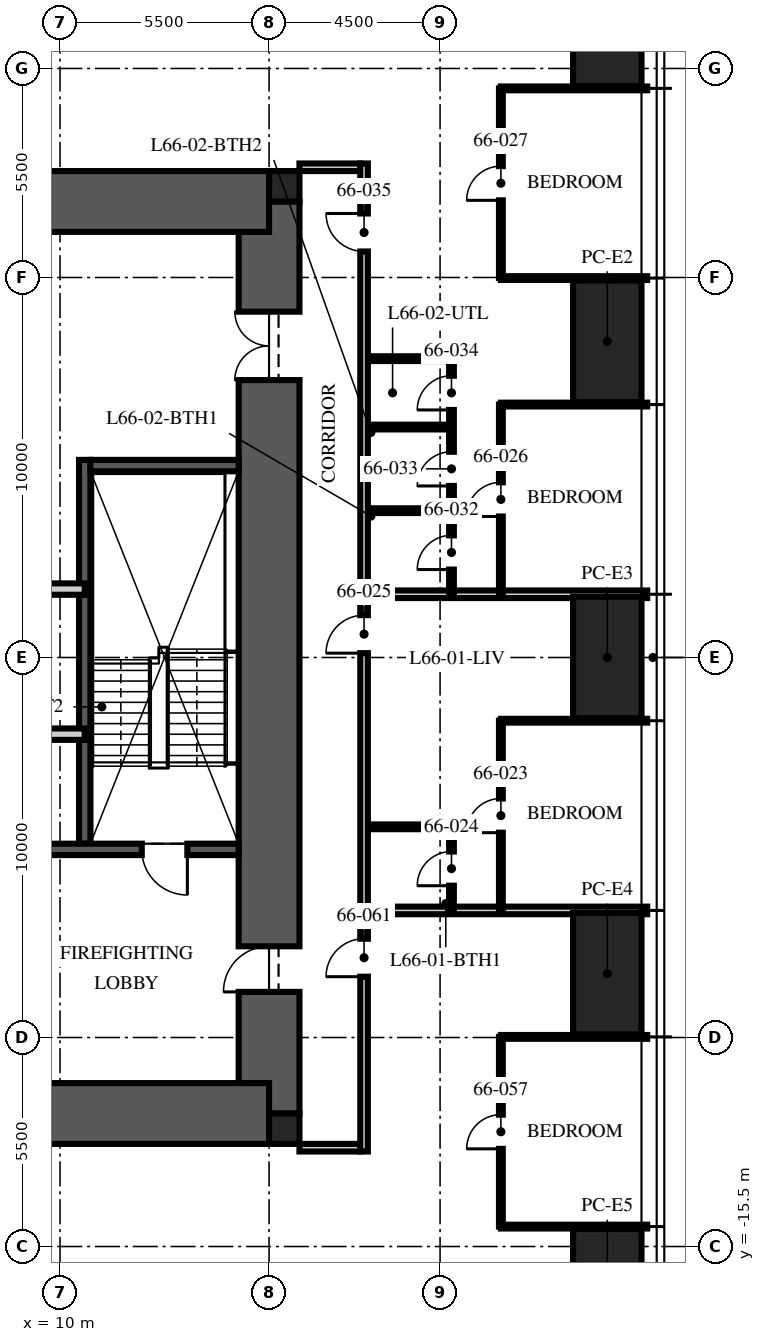
"""IFC4 building model, lengths in metres.
Left out: names, types, materials, properties, quantities, classifications, styles, units other than length and angle.
Written with IfcOpenShell. Run it as: python <this file> out.ifc"""

import sys

from ifc_helpers import new_model, si_unit, direction, frame, frame_2d, origin, origin_2d, place, context, subcontext, project, spatial, rectangle, hollow_rectangle, extrude, element, fill, save


model = new_model("IFC4")
c1 = context("Model", 3, precision=1e-05, world=origin(), true_north=direction((0.0, 1.0)))
c2 = subcontext(c1, "Body", "Model", "MODEL_VIEW")
j1 = project(units=[si_unit("LENGTHUNIT", "METRE"), si_unit("PLANEANGLEUNIT", "RADIAN")], contexts=[c1])
p1 = place(None, origin())
s1 = spatial("IfcSite", under=j1, at=p1, CompositionType="ELEMENT")
p2 = place(p1, origin())
s2 = spatial("IfcBuilding", under=s1, at=p2, CompositionType="ELEMENT")
p3 = place(p2, frame((0.0, 0.0, 263.25)))
s3 = spatial("IfcBuildingStorey", under=s2, at=p3, CompositionType="ELEMENT", Elevation=263.25)
p4 = place(p3, frame((15.5, -12.0, -0.25), z_axis=(0.0, 0.0, 1.0), x_axis=(0.0, 1.0, 0.0)))
e1 = element("IfcWall", 1, at=p4, inside=s3, PredefinedType="SHEAR", context=c2, shape_type="SweptSolid", body=[
    extrude(rectangle(XDim=24.0, YDim=1.6, at=frame_2d((12.0, 0.0))), origin(), (0.0, 0.0, 1.0), 3.75),
])
p5 = place(p4, frame((3.2, 0.0, 0.25)))
e2 = element("IfcOpeningElement", 2, at=p5, cuts=e1, PredefinedType="OPENING", context=c2, shape_type="SweptSolid", body=[
    extrude(rectangle(XDim=1.2, YDim=2.1, at=frame_2d((0.6, 1.05))), frame((0.0, 0.81, 0.0), z_axis=(0.0, -1.0, 0.0), x_axis=(1.0, 0.0, 0.0)), (0.0, 0.0, 1.0), 1.62),
])
p6 = place(p4, frame((19.3, 0.0, 0.25)))
e3 = element("IfcOpeningElement", 3, at=p6, cuts=e1, PredefinedType="OPENING", context=c2, shape_type="SweptSolid", body=[
    extrude(rectangle(XDim=1.8, YDim=2.1, at=frame_2d((0.9, 1.05))), frame((0.0, 0.81, 0.0), z_axis=(0.0, -1.0, 0.0), x_axis=(1.0, 0.0, 0.0)), (0.0, 0.0, 1.0), 1.62),
])
for number, where, z_axis, x_axis in (
    (4, (-15.5, 12.0, -0.25), (0.0, 0.0, 1.0), (1.0, 0.0, 0.0)),
    (5, (-15.5, -12.0, -0.25), (0.0, 0.0, 1.0), (1.0, 0.0, 0.0)),
):
    element("IfcWall", number, at=place(p3, frame(where, z_axis=z_axis, x_axis=x_axis)), inside=s3, PredefinedType="SHEAR", context=c2, shape_type="SweptSolid", body=[
        extrude(rectangle(XDim=31.0, YDim=1.6, at=frame_2d((15.5, 0.0))), origin(), (0.0, 0.0, 1.0), 3.75),
    ])
for number, where, z_axis, x_axis in (
    (6, (15.9, 12.4, -0.25), (0.0, 0.0, 1.0), (1.0, 0.0, 0.0)),
    (7, (15.9, -12.4, -0.25), (0.0, 0.0, 1.0), (1.0, 0.0, 0.0)),
):
    element("IfcColumn", number, at=place(p3, frame(where, z_axis=z_axis, x_axis=x_axis)), inside=s3, PredefinedType="COLUMN", context=c2, shape_type="SweptSolid", body=[
        extrude(rectangle(XDim=0.8, YDim=0.8, at=origin_2d()), origin(), (0.0, 0.0, 1.0), 3.75),
    ])
for number, where, z_axis, x_axis in (
    (8, (24.4, 16.64, 0.0), (0.0, 0.0, 1.0), (0.0, 1.0, 0.0)),
    (9, (24.4, 8.32, 0.0), (0.0, 0.0, 1.0), (0.0, 1.0, 0.0)),
    (10, (24.4, 0.0, 0.0), (0.0, 0.0, 1.0), (0.0, 1.0, 0.0)),
    (11, (24.4, -8.32, 0.0), (0.0, 0.0, 1.0), (0.0, 1.0, 0.0)),
    (12, (24.4, -16.64, 0.0), (0.0, 0.0, 1.0), (0.0, 1.0, 0.0)),
):
    element("IfcColumn", number, at=place(p3, frame(where, z_axis=z_axis, x_axis=x_axis)), inside=s3, PredefinedType="COLUMN", context=c2, shape_type="SweptSolid", body=[
        extrude(hollow_rectangle(XDim=3.2, YDim=1.8, WallThickness=0.14, at=origin_2d()), origin(), (0.0, 0.0, 1.0), 3.75),
    ])
p7 = place(p3, frame((10.65, -4.9, 0.0), z_axis=(0.0, 0.0, 1.0), x_axis=(0.0, 1.0, 0.0)))
e13 = element("IfcWall", 13, at=p7, inside=s3, PredefinedType="SOLIDWALL", context=c2, shape_type="SweptSolid", body=[
    extrude(rectangle(XDim=10.1, YDim=0.3, at=frame_2d((5.05, 0.0))), origin(), (0.0, 0.0, 1.0), 3.5),
])
p8 = place(p3, frame((14.7, -5.05, 0.0), z_axis=(0.0, 0.0, 1.0), x_axis=(-1.0, 0.0, 0.0)))
e14 = element("IfcWall", 14, at=p8, inside=s3, PredefinedType="SOLIDWALL", context=c2, shape_type="SweptSolid", body=[
    extrude(rectangle(XDim=5.9, YDim=0.3, at=frame_2d((2.95, 0.0))), origin(), (0.0, 0.0, 1.0), 3.5),
])
p9 = place(p8, frame((1.35, 0.0, 0.0)))
e15 = element("IfcOpeningElement", 15, at=p9, cuts=e14, PredefinedType="OPENING", context=c2, shape_type="SweptSolid", body=[
    extrude(rectangle(XDim=1.2, YDim=2.1, at=frame_2d((0.6, 1.05))), frame((0.0, 0.16, 0.0), z_axis=(0.0, -1.0, 0.0), x_axis=(1.0, 0.0, 0.0)), (0.0, 0.0, 1.0), 0.32),
])
p10 = place(p3, frame((14.7, 5.05, 0.0), z_axis=(0.0, 0.0, 1.0), x_axis=(-1.0, 0.0, 0.0)))
e16 = element("IfcWall", 16, at=p10, inside=s3, PredefinedType="SOLIDWALL", context=c2, shape_type="SweptSolid", body=[
    extrude(rectangle(XDim=3.9, YDim=0.3, at=frame_2d((1.95, 0.0))), origin(), (0.0, 0.0, 1.0), 3.5),
])
p11 = place(p3, frame((-10.65, 1.8, 0.0), z_axis=(0.0, 0.0, 1.0), x_axis=(1.0, 0.0, 0.0)))
e17 = element("IfcWall", 17, at=p11, inside=s3, PredefinedType="PARTITIONING", context=c2, shape_type="SweptSolid", body=[
    extrude(rectangle(XDim=21.3, YDim=0.3, at=frame_2d((10.65, 0.0))), origin(), (0.0, 0.0, 1.0), 3.5),
])
p12 = place(p11, frame((10.05, 0.0, 0.0)))
e18 = element("IfcOpeningElement", 18, at=p12, cuts=e17, PredefinedType="OPENING", context=c2, shape_type="SweptSolid", body=[
    extrude(rectangle(XDim=1.2, YDim=2.1, at=frame_2d((0.6, 1.05))), frame((0.0, 0.16, 0.0), z_axis=(0.0, -1.0, 0.0), x_axis=(1.0, 0.0, 0.0)), (0.0, 0.0, 1.0), 0.32),
])
p13 = place(p11, frame((0.938, 0.0, 0.0)))
e19 = element("IfcOpeningElement", 19, at=p13, cuts=e17, PredefinedType="OPENING", context=c2, shape_type="SweptSolid", body=[
    extrude(rectangle(XDim=0.9, YDim=2.1, at=frame_2d((0.45, 1.05))), frame((0.0, 0.16, 0.0), z_axis=(0.0, -1.0, 0.0), x_axis=(1.0, 0.0, 0.0)), (0.0, 0.0, 1.0), 0.32),
])
p14 = place(p3, frame((10.65, -2.018, 0.0), z_axis=(0.0, 0.0, 1.0), x_axis=(-1.0, 0.0, 0.0)))
e20 = element("IfcWall", 20, at=p14, inside=s3, PredefinedType="PARTITIONING", context=c2, shape_type="SweptSolid", body=[
    extrude(rectangle(XDim=5.55, YDim=0.3, at=frame_2d((2.775, 0.0))), origin(), (0.0, 0.0, 1.0), 3.5),
])
for number, where, z_axis, x_axis in (
    (21, (16.3, 12.9, 0.0), (0.0, 0.0, 1.0), (1.0, 0.0, 0.0)),
    (22, (16.3, -12.9, 0.0), (0.0, 0.0, 1.0), (1.0, 0.0, 0.0)),
):
    element("IfcWall", number, at=place(p3, frame(where, z_axis=z_axis, x_axis=x_axis)), inside=s3, PredefinedType="PARTITIONING", context=c2, shape_type="SweptSolid", body=[
        extrude(rectangle(XDim=1.6, YDim=0.2, at=frame_2d((0.8, 0.0))), origin(), (0.0, 0.0, 1.0), 2.3),
    ])
p15 = place(p3, frame((18.1, -6.656, 0.0), z_axis=(0.0, 0.0, 1.0), x_axis=(1.0, 0.0, 0.0)))
e23 = element("IfcWall", 23, at=p15, inside=s3, PredefinedType="PARTITIONING", context=c2, shape_type="SweptSolid", body=[
    extrude(rectangle(XDim=7.35, YDim=0.2, at=frame_2d((3.675, 0.0))), origin(), (0.0, 0.0, 1.0), 2.91),
])
p16 = place(p3, frame((21.6, -1.664, 0.0), z_axis=(0.0, 0.0, 1.0), x_axis=(1.0, 0.0, 0.0)))
e24 = element("IfcWall", 24, at=p16, inside=s3, PredefinedType="PARTITIONING", context=c2, shape_type="SweptSolid", body=[
    extrude(rectangle(XDim=3.85, YDim=0.1, at=frame_2d((1.925, 0.0))), origin(), (0.0, 0.0, 1.0), 2.91),
])
p17 = place(p3, frame((18.1, 1.664, 0.0), z_axis=(0.0, 0.0, 1.0), x_axis=(1.0, 0.0, 0.0)))
e25 = element("IfcWall", 25, at=p17, inside=s3, PredefinedType="PARTITIONING", context=c2, shape_type="SweptSolid", body=[
    extrude(rectangle(XDim=7.35, YDim=0.2, at=frame_2d((3.675, 0.0))), origin(), (0.0, 0.0, 1.0), 2.91),
])
for number, where, z_axis, x_axis in (
    (26, (21.6, 6.656, 0.0), (0.0, 0.0, 1.0), (1.0, 0.0, 0.0)),
    (27, (21.6, 9.984, 0.0), (0.0, 0.0, 1.0), (1.0, 0.0, 0.0)),
    (28, (21.6, 14.976, 0.0), (0.0, 0.0, 1.0), (1.0, 0.0, 0.0)),
    (29, (21.6, -14.976, 0.0), (0.0, 0.0, 1.0), (1.0, 0.0, 0.0)),
    (30, (21.6, -9.984, 0.0), (0.0, 0.0, 1.0), (1.0, 0.0, 0.0)),
):
    element("IfcWall", number, at=place(p3, frame(where, z_axis=z_axis, x_axis=x_axis)), inside=s3, PredefinedType="PARTITIONING", context=c2, shape_type="SweptSolid", body=[
        extrude(rectangle(XDim=3.85, YDim=0.1, at=frame_2d((1.925, 0.0))), origin(), (0.0, 0.0, 1.0), 2.91),
    ])
p18 = place(p3, frame((21.6, -6.656, 0.0), z_axis=(0.0, 0.0, 1.0), x_axis=(0.0, 1.0, 0.0)))
e31 = element("IfcWall", 31, at=p18, inside=s3, PredefinedType="PARTITIONING", context=c2, shape_type="SweptSolid", body=[
    extrude(rectangle(XDim=4.992, YDim=0.1, at=frame_2d((2.496, 0.0))), origin(), (0.0, 0.0, 1.0), 2.81),
])
p19 = place(p18, frame((2.046, 0.0, 0.0)))
e32 = element("IfcOpeningElement", 32, at=p19, cuts=e31, PredefinedType="OPENING", context=c2, shape_type="SweptSolid", body=[
    extrude(rectangle(XDim=0.9, YDim=2.1, at=frame_2d((0.45, 1.05))), frame((0.0, 0.06, 0.0), z_axis=(0.0, -1.0, 0.0), x_axis=(1.0, 0.0, 0.0)), (0.0, 0.0, 1.0), 0.12),
])
p20 = place(p3, frame((20.3, -6.656, 0.0), z_axis=(0.0, 0.0, 1.0), x_axis=(0.0, 1.0, 0.0)))
e33 = element("IfcWall", 33, at=p20, inside=s3, PredefinedType="PARTITIONING", context=c2, shape_type="SweptSolid", body=[
    extrude(rectangle(XDim=2.2, YDim=0.125, at=frame_2d((1.1, 0.0))), origin(), (0.0, 0.0, 1.0), 3.5),
])
p21 = place(p20, frame((0.65, 0.0, 0.0)))
e34 = element("IfcOpeningElement", 34, at=p21, cuts=e33, PredefinedType="OPENING", context=c2, shape_type="SweptSolid", body=[
    extrude(rectangle(XDim=0.9, YDim=2.1, at=frame_2d((0.45, 1.05))), frame((0.0, 0.073, 0.0), z_axis=(0.0, -1.0, 0.0), x_axis=(1.0, 0.0, 0.0)), (0.0, 0.0, 1.0), 0.145),
])
p22 = place(p3, frame((18.1, -4.456, 0.0), z_axis=(0.0, 0.0, 1.0), x_axis=(1.0, 0.0, 0.0)))
e35 = element("IfcWall", 35, at=p22, inside=s3, PredefinedType="PARTITIONING", context=c2, shape_type="SweptSolid", body=[
    extrude(rectangle(XDim=2.2, YDim=0.125, at=frame_2d((1.1, 0.0))), origin(), (0.0, 0.0, 1.0), 3.5),
])
p23 = place(p3, frame((21.6, 1.664, 0.0), z_axis=(0.0, 0.0, 1.0), x_axis=(0.0, 1.0, 0.0)))
e36 = element("IfcWall", 36, at=p23, inside=s3, PredefinedType="PARTITIONING", context=c2, shape_type="SweptSolid", body=[
    extrude(rectangle(XDim=4.992, YDim=0.1, at=frame_2d((2.496, 0.0))), origin(), (0.0, 0.0, 1.0), 2.81),
])
p24 = place(p23, frame((2.046, 0.0, 0.0)))
e37 = element("IfcOpeningElement", 37, at=p24, cuts=e36, PredefinedType="OPENING", context=c2, shape_type="SweptSolid", body=[
    extrude(rectangle(XDim=0.9, YDim=2.1, at=frame_2d((0.45, 1.05))), frame((0.0, 0.06, 0.0), z_axis=(0.0, -1.0, 0.0), x_axis=(1.0, 0.0, 0.0)), (0.0, 0.0, 1.0), 0.12),
])
p25 = place(p3, frame((21.6, 9.984, 0.0), z_axis=(0.0, 0.0, 1.0), x_axis=(0.0, 1.0, 0.0)))
e38 = element("IfcWall", 38, at=p25, inside=s3, PredefinedType="PARTITIONING", context=c2, shape_type="SweptSolid", body=[
    extrude(rectangle(XDim=4.992, YDim=0.1, at=frame_2d((2.496, 0.0))), origin(), (0.0, 0.0, 1.0), 2.81),
])
p26 = place(p25, frame((2.046, 0.0, 0.0)))
e39 = element("IfcOpeningElement", 39, at=p26, cuts=e38, PredefinedType="OPENING", context=c2, shape_type="SweptSolid", body=[
    extrude(rectangle(XDim=0.9, YDim=2.1, at=frame_2d((0.45, 1.05))), frame((0.0, 0.06, 0.0), z_axis=(0.0, -1.0, 0.0), x_axis=(1.0, 0.0, 0.0)), (0.0, 0.0, 1.0), 0.12),
])
p27 = place(p3, frame((20.3, 1.664, 0.0), z_axis=(0.0, 0.0, 1.0), x_axis=(0.0, 1.0, 0.0)))
e40 = element("IfcWall", 40, at=p27, inside=s3, PredefinedType="PARTITIONING", context=c2, shape_type="SweptSolid", body=[
    extrude(rectangle(XDim=6.2, YDim=0.125, at=frame_2d((3.1, 0.0))), origin(), (0.0, 0.0, 1.0), 2.81),
])
p28 = place(p27, frame((0.65, 0.0, 0.0)))
e41 = element("IfcOpeningElement", 41, at=p28, cuts=e40, PredefinedType="OPENING", context=c2, shape_type="SweptSolid", body=[
    extrude(rectangle(XDim=0.9, YDim=2.1, at=frame_2d((0.45, 1.05))), frame((0.0, 0.073, 0.0), z_axis=(0.0, -1.0, 0.0), x_axis=(1.0, 0.0, 0.0)), (0.0, 0.0, 1.0), 0.145),
])
p29 = place(p27, frame((2.85, 0.0, 0.0)))
e42 = element("IfcOpeningElement", 42, at=p29, cuts=e40, PredefinedType="OPENING", context=c2, shape_type="SweptSolid", body=[
    extrude(rectangle(XDim=0.9, YDim=2.1, at=frame_2d((0.45, 1.05))), frame((0.0, 0.073, 0.0), z_axis=(0.0, -1.0, 0.0), x_axis=(1.0, 0.0, 0.0)), (0.0, 0.0, 1.0), 0.145),
])
p30 = place(p27, frame((4.85, 0.0, 0.0)))
e43 = element("IfcOpeningElement", 43, at=p30, cuts=e40, PredefinedType="OPENING", context=c2, shape_type="SweptSolid", body=[
    extrude(rectangle(XDim=0.9, YDim=2.1, at=frame_2d((0.45, 1.05))), frame((0.0, 0.073, 0.0), z_axis=(0.0, -1.0, 0.0), x_axis=(1.0, 0.0, 0.0)), (0.0, 0.0, 1.0), 0.145),
])
for number, where, z_axis, x_axis in (
    (44, (18.1, 3.864, 0.0), (0.0, 0.0, 1.0), (1.0, 0.0, 0.0)),
    (45, (18.1, 6.064, 0.0), (0.0, 0.0, 1.0), (1.0, 0.0, 0.0)),
    (46, (18.1, 7.864, 0.0), (0.0, 0.0, 1.0), (1.0, 0.0, 0.0)),
):
    element("IfcWall", number, at=place(p3, frame(where, z_axis=z_axis, x_axis=x_axis)), inside=s3, PredefinedType="PARTITIONING", context=c2, shape_type="SweptSolid", body=[
        extrude(rectangle(XDim=2.2, YDim=0.125, at=frame_2d((1.1, 0.0))), origin(), (0.0, 0.0, 1.0), 3.5),
    ])
p31 = place(p3, frame((21.6, -14.976, 0.0), z_axis=(0.0, 0.0, 1.0), x_axis=(0.0, 1.0, 0.0)))
e47 = element("IfcWall", 47, at=p31, inside=s3, PredefinedType="PARTITIONING", context=c2, shape_type="SweptSolid", body=[
    extrude(rectangle(XDim=4.992, YDim=0.1, at=frame_2d((2.496, 0.0))), origin(), (0.0, 0.0, 1.0), 2.81),
])
p32 = place(p31, frame((2.046, 0.0, 0.0)))
e48 = element("IfcOpeningElement", 48, at=p32, cuts=e47, PredefinedType="OPENING", context=c2, shape_type="SweptSolid", body=[
    extrude(rectangle(XDim=0.9, YDim=2.1, at=frame_2d((0.45, 1.05))), frame((0.0, 0.06, 0.0), z_axis=(0.0, -1.0, 0.0), x_axis=(1.0, 0.0, 0.0)), (0.0, 0.0, 1.0), 0.12),
])
p33 = place(p3, frame((18.0, -13.0, 0.0), z_axis=(0.0, 0.0, 1.0), x_axis=(0.0, 1.0, 0.0)))
e49 = element("IfcWall", 49, at=p33, inside=s3, PredefinedType="PARTITIONING", context=c2, shape_type="SweptSolid", body=[
    extrude(rectangle(XDim=26.0, YDim=0.2, at=frame_2d((13.0, 0.0))), origin(), (0.0, 0.0, 1.0), 2.6),
])
p34 = place(p33, frame((13.114, 0.0, 0.0)))
e50 = element("IfcOpeningElement", 50, at=p34, cuts=e49, PredefinedType="OPENING", context=c2, shape_type="SweptSolid", body=[
    extrude(rectangle(XDim=1.0, YDim=2.2, at=frame_2d((0.5, 1.1))), frame((0.0, 0.11, 0.0), z_axis=(0.0, -1.0, 0.0), x_axis=(1.0, 0.0, 0.0)), (0.0, 0.0, 1.0), 0.22),
])
p35 = place(p33, frame((23.684, 0.0, 0.0)))
e51 = element("IfcOpeningElement", 51, at=p35, cuts=e49, PredefinedType="OPENING", context=c2, shape_type="SweptSolid", body=[
    extrude(rectangle(XDim=1.0, YDim=2.2, at=frame_2d((0.5, 1.1))), frame((0.0, 0.11, 0.0), z_axis=(0.0, -1.0, 0.0), x_axis=(1.0, 0.0, 0.0)), (0.0, 0.0, 1.0), 0.22),
])
p36 = place(p33, frame((4.6, 0.0, 0.0)))
e52 = element("IfcOpeningElement", 52, at=p36, cuts=e49, PredefinedType="OPENING", context=c2, shape_type="SweptSolid", body=[
    extrude(rectangle(XDim=1.0, YDim=2.2, at=frame_2d((0.5, 1.1))), frame((0.0, 0.11, 0.0), z_axis=(0.0, -1.0, 0.0), x_axis=(1.0, 0.0, 0.0)), (0.0, 0.0, 1.0), 0.22),
])
p37 = place(p9, origin())
e53 = element("IfcDoor", 53, at=p37, inside=s3, OperationType="SINGLE_SWING_LEFT", PredefinedType="DOOR", context=c2, shape_type="SweptSolid", body=[
    extrude(rectangle(XDim=1.2, YDim=2.1, at=frame_2d((0.6, 1.05))), frame((0.0, 0.025, 0.0), z_axis=(0.0, -1.0, 0.0), x_axis=(1.0, 0.0, 0.0)), (0.0, 0.0, 1.0), 0.05),
])
fill(e15, e53)
p38 = place(p5, origin())
e54 = element("IfcDoor", 54, at=p38, inside=s3, OperationType="SINGLE_SWING_LEFT", PredefinedType="DOOR", context=c2, shape_type="SweptSolid", body=[
    extrude(rectangle(XDim=1.2, YDim=2.1, at=frame_2d((0.6, 1.05))), frame((0.0, 0.025, 0.0), z_axis=(0.0, -1.0, 0.0), x_axis=(1.0, 0.0, 0.0)), (0.0, 0.0, 1.0), 0.05),
])
fill(e2, e54)
p39 = place(p6, origin())
e55 = element("IfcDoor", 55, at=p39, inside=s3, OperationType="DOUBLE_DOOR_SINGLE_SWING", PredefinedType="DOOR", context=c2, shape_type="SweptSolid", body=[
    extrude(rectangle(XDim=1.8, YDim=2.1, at=frame_2d((0.9, 1.05))), frame((0.0, 0.025, 0.0), z_axis=(0.0, -1.0, 0.0), x_axis=(1.0, 0.0, 0.0)), (0.0, 0.0, 1.0), 0.05),
])
fill(e3, e55)
p40 = place(p19, origin())
e56 = element("IfcDoor", 56, at=p40, inside=s3, OperationType="SINGLE_SWING_LEFT", PredefinedType="DOOR", context=c2, shape_type="SweptSolid", body=[
    extrude(rectangle(XDim=0.9, YDim=2.1, at=frame_2d((0.45, 1.05))), frame((0.0, 0.025, 0.0), z_axis=(0.0, -1.0, 0.0), x_axis=(1.0, 0.0, 0.0)), (0.0, 0.0, 1.0), 0.05),
])
fill(e32, e56)
p41 = place(p21, origin())
e57 = element("IfcDoor", 57, at=p41, inside=s3, OperationType="SINGLE_SWING_LEFT", PredefinedType="DOOR", context=c2, shape_type="SweptSolid", body=[
    extrude(rectangle(XDim=0.9, YDim=2.1, at=frame_2d((0.45, 1.05))), frame((0.0, 0.025, 0.0), z_axis=(0.0, -1.0, 0.0), x_axis=(1.0, 0.0, 0.0)), (0.0, 0.0, 1.0), 0.05),
])
fill(e34, e57)
p42 = place(p34, origin())
e58 = element("IfcDoor", 58, at=p42, inside=s3, OperationType="SINGLE_SWING_LEFT", PredefinedType="DOOR", context=c2, shape_type="SweptSolid", body=[
    extrude(rectangle(XDim=1.0, YDim=2.2, at=frame_2d((0.5, 1.1))), frame((0.0, 0.025, 0.0), z_axis=(0.0, -1.0, 0.0), x_axis=(1.0, 0.0, 0.0)), (0.0, 0.0, 1.0), 0.05),
])
fill(e50, e58)
p43 = place(p24, origin())
e59 = element("IfcDoor", 59, at=p43, inside=s3, OperationType="SINGLE_SWING_LEFT", PredefinedType="DOOR", context=c2, shape_type="SweptSolid", body=[
    extrude(rectangle(XDim=0.9, YDim=2.1, at=frame_2d((0.45, 1.05))), frame((0.0, 0.025, 0.0), z_axis=(0.0, -1.0, 0.0), x_axis=(1.0, 0.0, 0.0)), (0.0, 0.0, 1.0), 0.05),
])
fill(e37, e59)
p44 = place(p26, origin())
e60 = element("IfcDoor", 60, at=p44, inside=s3, OperationType="SINGLE_SWING_LEFT", PredefinedType="DOOR", context=c2, shape_type="SweptSolid", body=[
    extrude(rectangle(XDim=0.9, YDim=2.1, at=frame_2d((0.45, 1.05))), frame((0.0, 0.025, 0.0), z_axis=(0.0, -1.0, 0.0), x_axis=(1.0, 0.0, 0.0)), (0.0, 0.0, 1.0), 0.05),
])
fill(e39, e60)
p45 = place(p28, origin())
e61 = element("IfcDoor", 61, at=p45, inside=s3, OperationType="SINGLE_SWING_LEFT", PredefinedType="DOOR", context=c2, shape_type="SweptSolid", body=[
    extrude(rectangle(XDim=0.9, YDim=2.1, at=frame_2d((0.45, 1.05))), frame((0.0, 0.025, 0.0), z_axis=(0.0, -1.0, 0.0), x_axis=(1.0, 0.0, 0.0)), (0.0, 0.0, 1.0), 0.05),
])
fill(e41, e61)
p46 = place(p29, origin())
e62 = element("IfcDoor", 62, at=p46, inside=s3, OperationType="SINGLE_SWING_LEFT", PredefinedType="DOOR", context=c2, shape_type="SweptSolid", body=[
    extrude(rectangle(XDim=0.9, YDim=2.1, at=frame_2d((0.45, 1.05))), frame((0.0, 0.025, 0.0), z_axis=(0.0, -1.0, 0.0), x_axis=(1.0, 0.0, 0.0)), (0.0, 0.0, 1.0), 0.05),
])
fill(e42, e62)
p47 = place(p30, origin())
e63 = element("IfcDoor", 63, at=p47, inside=s3, OperationType="SINGLE_SWING_LEFT", PredefinedType="DOOR", context=c2, shape_type="SweptSolid", body=[
    extrude(rectangle(XDim=0.9, YDim=2.1, at=frame_2d((0.45, 1.05))), frame((0.0, 0.025, 0.0), z_axis=(0.0, -1.0, 0.0), x_axis=(1.0, 0.0, 0.0)), (0.0, 0.0, 1.0), 0.05),
])
fill(e43, e63)
p48 = place(p35, origin())
e64 = element("IfcDoor", 64, at=p48, inside=s3, OperationType="SINGLE_SWING_RIGHT", PredefinedType="DOOR", context=c2, shape_type="SweptSolid", body=[
    extrude(rectangle(XDim=1.0, YDim=2.2, at=frame_2d((0.5, 1.1))), frame((0.0, 0.025, 0.0), z_axis=(0.0, -1.0, 0.0), x_axis=(1.0, 0.0, 0.0)), (0.0, 0.0, 1.0), 0.05),
])
fill(e51, e64)
p49 = place(p32, origin())
e65 = element("IfcDoor", 65, at=p49, inside=s3, OperationType="SINGLE_SWING_LEFT", PredefinedType="DOOR", context=c2, shape_type="SweptSolid", body=[
    extrude(rectangle(XDim=0.9, YDim=2.1, at=frame_2d((0.45, 1.05))), frame((0.0, 0.025, 0.0), z_axis=(0.0, -1.0, 0.0), x_axis=(1.0, 0.0, 0.0)), (0.0, 0.0, 1.0), 0.05),
])
fill(e48, e65)
p50 = place(p36, origin())
e66 = element("IfcDoor", 66, at=p50, inside=s3, OperationType="SINGLE_SWING_LEFT", PredefinedType="DOOR", context=c2, shape_type="SweptSolid", body=[
    extrude(rectangle(XDim=1.0, YDim=2.2, at=frame_2d((0.5, 1.1))), frame((0.0, 0.025, 0.0), z_axis=(0.0, -1.0, 0.0), x_axis=(1.0, 0.0, 0.0)), (0.0, 0.0, 1.0), 0.05),
])
fill(e52, e66)
save(model, sys.argv[1])
